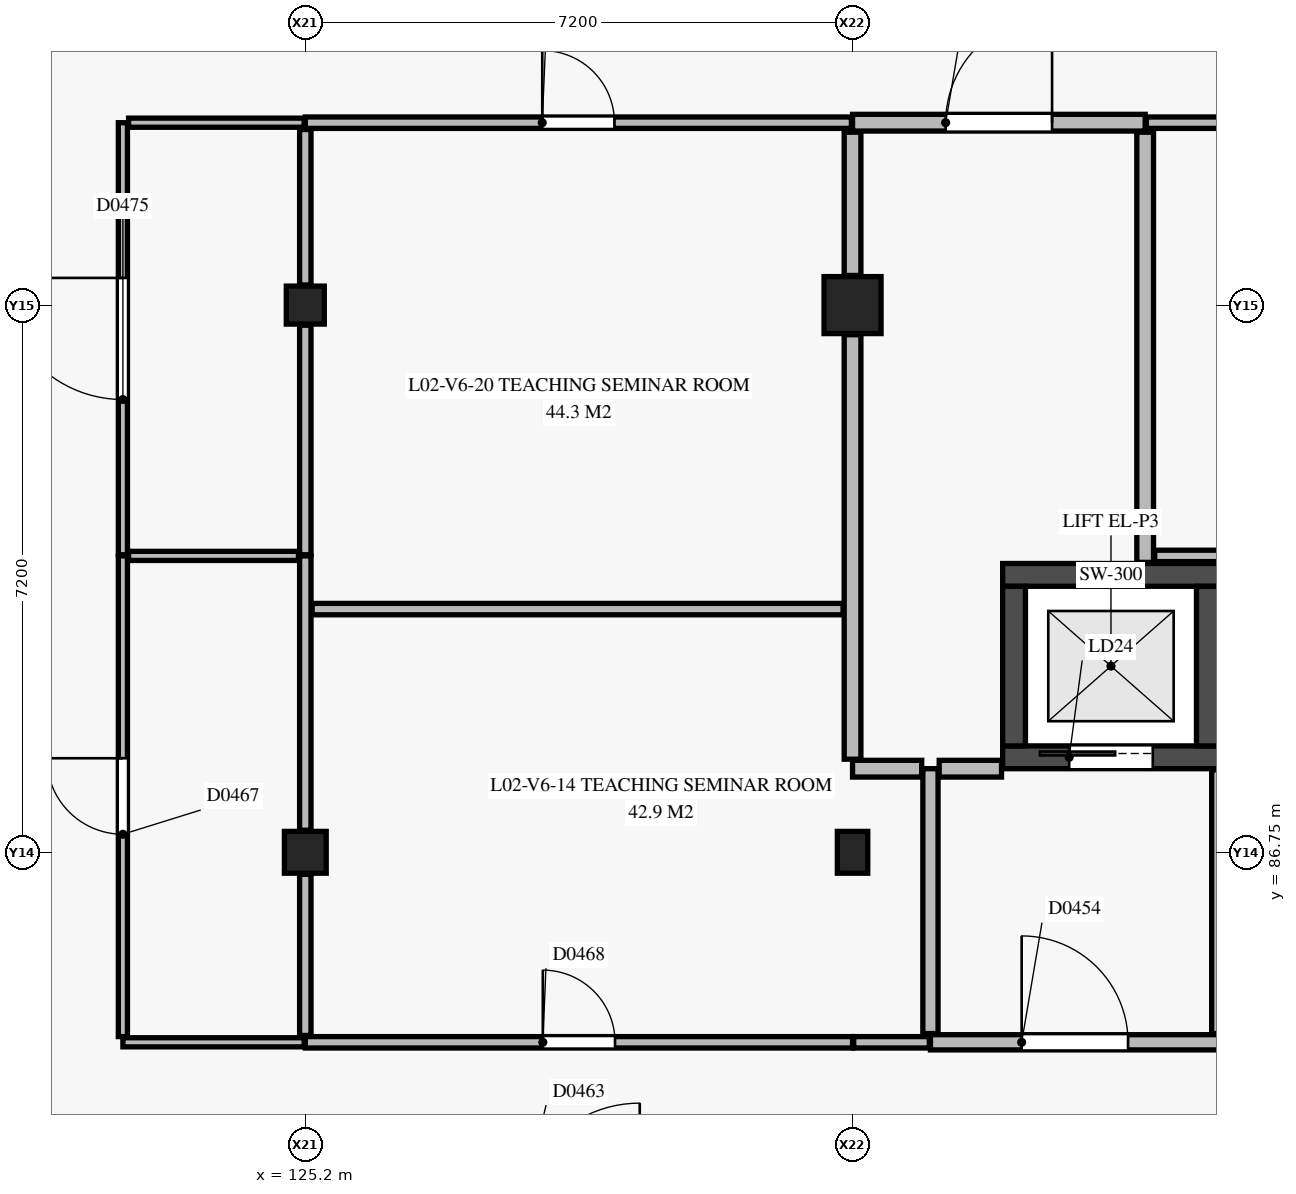
"""IFC4 building model, lengths in metres.
Left out: names, types, materials, properties, quantities, classifications, styles, units other than length and angle.
Written with IfcOpenShell. Run it as: python <this file> out.ifc"""

import sys

from ifc_helpers import new_model, si_unit, direction, frame, frame_2d, origin, origin_2d, place, context, subcontext, project, spatial, rectangle, extrude, element, fill, save


model = new_model("IFC4")
c1 = context("Model", 3, precision=1e-05, world=origin(), true_north=direction((0.0, 1.0)))
c2 = subcontext(c1, "Body", "Model", "MODEL_VIEW")
j1 = project(units=[si_unit("LENGTHUNIT", "METRE"), si_unit("PLANEANGLEUNIT", "RADIAN")], contexts=[c1])
p1 = place(None, origin())
s1 = spatial("IfcSite", under=j1, at=p1, CompositionType="ELEMENT")
p2 = place(p1, origin())
s2 = spatial("IfcBuilding", under=s1, at=p2, CompositionType="ELEMENT")
p3 = place(p2, frame((0.0, 0.0, 9.0)))
s3 = spatial("IfcBuildingStorey", under=s2, at=p3, CompositionType="ELEMENT", Elevation=9.0)
p4 = place(p3, frame((125.2, 86.75, 0.0), z_axis=(0.0, 0.0, 1.0), x_axis=(1.0, 0.0, 0.0)))
e1 = element("IfcColumn", 1, at=p4, inside=s3, PredefinedType="COLUMN", context=c2, shape_type="SweptSolid", body=[
    extrude(rectangle(XDim=0.55, YDim=0.55, at=origin_2d()), origin(), (0.0, 0.0, 1.0), 4.2),
])
p5 = place(p3, frame((125.2, 93.95, 0.0), z_axis=(0.0, 0.0, 1.0), x_axis=(1.0, 0.0, 0.0)))
e2 = element("IfcColumn", 2, at=p5, inside=s3, PredefinedType="COLUMN", context=c2, shape_type="SweptSolid", body=[
    extrude(rectangle(XDim=0.5, YDim=0.5, at=origin_2d()), origin(), (0.0, 0.0, 1.0), 4.2),
])
p6 = place(p3, frame((132.4, 86.75, 0.0), z_axis=(0.0, 0.0, 1.0), x_axis=(1.0, 0.0, 0.0)))
e3 = element("IfcColumn", 3, at=p6, inside=s3, PredefinedType="COLUMN", context=c2, shape_type="SweptSolid", body=[
    extrude(rectangle(XDim=0.4, YDim=0.55, at=origin_2d()), origin(), (0.0, 0.0, 1.0), 4.2),
])
p7 = place(p3, frame((132.4, 93.95, 0.0), z_axis=(0.0, 0.0, 1.0), x_axis=(1.0, 0.0, 0.0)))
e4 = element("IfcColumn", 4, at=p7, inside=s3, PredefinedType="COLUMN", context=c2, shape_type="SweptSolid", body=[
    extrude(rectangle(XDim=0.75, YDim=0.75, at=origin_2d()), origin(), (0.0, 0.0, 1.0), 4.2),
])
p8 = place(p3, frame((134.375, 88.0, 0.0), z_axis=(0.0, 0.0, 1.0), x_axis=(1.0, 0.0, 0.0)))
e5 = element("IfcWall", 5, at=p8, inside=s3, PredefinedType="SHEAR", context=c2, shape_type="SweptSolid", body=[
    extrude(rectangle(XDim=2.85, YDim=0.3, at=frame_2d((1.425, 0.0))), origin(), (0.0, 0.0, 1.0), 3.95),
])
p9 = place(p8, frame((0.875, 0.0, 0.0)))
e6 = element("IfcOpeningElement", 6, at=p9, cuts=e5, PredefinedType="OPENING", context=c2, shape_type="SweptSolid", body=[
    extrude(rectangle(XDim=1.1, YDim=2.15, at=frame_2d((0.55, 1.075))), frame((0.0, 0.16, 0.0), z_axis=(0.0, -1.0, 0.0), x_axis=(1.0, 0.0, 0.0)), (0.0, 0.0, 1.0), 0.32),
])
p10 = place(p3, frame((134.375, 90.4, 0.0), z_axis=(0.0, 0.0, 1.0), x_axis=(1.0, 0.0, 0.0)))
e7 = element("IfcWall", 7, at=p10, inside=s3, PredefinedType="SHEAR", context=c2, shape_type="SweptSolid", body=[
    extrude(rectangle(XDim=2.85, YDim=0.3, at=frame_2d((1.425, 0.0))), origin(), (0.0, 0.0, 1.0), 3.95),
])
for number, where, z_axis, x_axis in (
    (8, (134.525, 88.15, 0.0), (0.0, 0.0, 1.0), (0.0, 1.0, 0.0)),
    (9, (137.075, 88.15, 0.0), (0.0, 0.0, 1.0), (0.0, 1.0, 0.0)),
):
    element("IfcWall", number, at=place(p3, frame(where, z_axis=z_axis, x_axis=x_axis)), inside=s3, PredefinedType="SHEAR", context=c2, shape_type="SweptSolid", body=[
        extrude(rectangle(XDim=2.1, YDim=0.3, at=frame_2d((1.05, 0.0))), origin(), (0.0, 0.0, 1.0), 3.95),
    ])
p11 = place(p3, frame((133.425, 84.25, 0.0), z_axis=(0.0, 0.0, 1.0), x_axis=(1.0, 0.0, 0.0)))
e10 = element("IfcWall", 10, at=p11, inside=s3, PredefinedType="PARTITIONING", context=c2, shape_type="SweptSolid", body=[
    extrude(rectangle(XDim=3.8, YDim=0.2, at=frame_2d((1.9, 0.0))), origin(), (0.0, 0.0, 1.0), 3.515),
])
p12 = place(p11, frame((1.2, 0.0, 0.0)))
e11 = element("IfcOpeningElement", 11, at=p12, cuts=e10, PredefinedType="OPENING", context=c2, shape_type="SweptSolid", body=[
    extrude(rectangle(XDim=1.4, YDim=2.2, at=frame_2d((0.7, 1.1))), frame((0.0, 0.11, 0.0), z_axis=(0.0, -1.0, 0.0), x_axis=(1.0, 0.0, 0.0)), (0.0, 0.0, 1.0), 0.22),
])
p13 = place(p3, frame((137.225, 84.365, 0.0), z_axis=(0.0, 0.0, 1.0), x_axis=(0.0, 1.0, 0.0)))
e12 = element("IfcWall", 12, at=p13, inside=s3, PredefinedType="PARTITIONING", context=c2, shape_type="SweptSolid", body=[
    extrude(rectangle(XDim=3.47, YDim=0.2, at=frame_2d((1.735, 0.0))), origin(), (0.0, 0.0, 1.0), 3.355),
])
p14 = place(p3, frame((133.425, 84.365, 0.0), z_axis=(0.0, 0.0, 1.0), x_axis=(0.0, 1.0, 0.0)))
e13 = element("IfcWall", 13, at=p14, inside=s3, PredefinedType="PARTITIONING", context=c2, shape_type="SweptSolid", body=[
    extrude(rectangle(XDim=3.485, YDim=0.2, at=frame_2d((1.743, 0.0))), origin(), (0.0, 0.0, 1.0), 3.355),
])
p15 = place(p3, frame((132.4, 96.35, 0.0), z_axis=(0.0, 0.0, 1.0), x_axis=(1.0, 0.0, 0.0)))
e14 = element("IfcWall", 14, at=p15, inside=s3, PredefinedType="PARTITIONING", context=c2, shape_type="SweptSolid", body=[
    extrude(rectangle(XDim=3.85, YDim=0.22, at=frame_2d((1.925, 0.0))), origin(), (0.0, 0.0, 1.0), 3.415),
])
p16 = place(p15, frame((1.225, 0.0, 0.0)))
e15 = element("IfcOpeningElement", 15, at=p16, cuts=e14, PredefinedType="OPENING", context=c2, shape_type="SweptSolid", body=[
    extrude(rectangle(XDim=1.4, YDim=2.2, at=frame_2d((0.7, 1.1))), frame((0.0, 0.12, 0.0), z_axis=(0.0, -1.0, 0.0), x_axis=(1.0, 0.0, 0.0)), (0.0, 0.0, 1.0), 0.24),
])
p17 = place(p3, frame((125.2, 84.25, 0.0), z_axis=(0.0, 0.0, 1.0), x_axis=(1.0, 0.0, 0.0)))
e16 = element("IfcWall", 16, at=p17, inside=s3, PredefinedType="PARTITIONING", context=c2, shape_type="SweptSolid", body=[
    extrude(rectangle(XDim=7.2, YDim=0.15, at=frame_2d((3.6, 0.0))), origin(), (0.0, 0.0, 1.0), 3.285),
])
p18 = place(p17, frame((3.125, 0.0, 0.0)))
e17 = element("IfcOpeningElement", 17, at=p18, cuts=e16, PredefinedType="OPENING", context=c2, shape_type="SweptSolid", body=[
    extrude(rectangle(XDim=0.95, YDim=2.1, at=frame_2d((0.475, 1.05))), frame((0.0, 0.085, 0.0), z_axis=(0.0, -1.0, 0.0), x_axis=(1.0, 0.0, 0.0)), (0.0, 0.0, 1.0), 0.17),
])
p19 = place(p3, frame((132.415, 84.25, 0.0), z_axis=(0.0, 0.0, 1.0), x_axis=(1.0, 0.0, 0.0)))
e18 = element("IfcWall", 18, at=p19, inside=s3, PredefinedType="PARTITIONING", context=c2, shape_type="SweptSolid", body=[
    extrude(rectangle(XDim=0.995, YDim=0.15, at=frame_2d((0.498, 0.0))), origin(), (0.0, 0.0, 1.0), 3.285),
])
p20 = place(p3, frame((125.2, 96.35, 0.0), z_axis=(0.0, 0.0, 1.0), x_axis=(1.0, 0.0, 0.0)))
e19 = element("IfcWall", 19, at=p20, inside=s3, PredefinedType="PARTITIONING", context=c2, shape_type="SweptSolid", body=[
    extrude(rectangle(XDim=7.185, YDim=0.15, at=frame_2d((3.593, 0.0))), origin(), (0.0, 0.0, 1.0), 3.215),
])
p21 = place(p20, frame((3.117, 0.0, 0.0)))
e20 = element("IfcOpeningElement", 20, at=p21, cuts=e19, PredefinedType="OPENING", context=c2, shape_type="SweptSolid", body=[
    extrude(rectangle(XDim=0.95, YDim=2.1, at=frame_2d((0.475, 1.05))), frame((0.0, 0.085, 0.0), z_axis=(0.0, -1.0, 0.0), x_axis=(1.0, 0.0, 0.0)), (0.0, 0.0, 1.0), 0.17),
])
p22 = place(p3, frame((136.265, 96.35, 0.0), z_axis=(0.0, 0.0, 1.0), x_axis=(1.0, 0.0, 0.0)))
e21 = element("IfcWall", 21, at=p22, inside=s3, PredefinedType="PARTITIONING", context=c2, shape_type="SweptSolid", body=[
    extrude(rectangle(XDim=3.32, YDim=0.15, at=frame_2d((1.66, 0.0))), origin(), (0.0, 0.0, 1.0), 3.285),
])
p23 = place(p22, frame((1.035, 0.0, 0.0)))
e22 = element("IfcOpeningElement", 22, at=p23, cuts=e21, PredefinedType="OPENING", context=c2, shape_type="SweptSolid", body=[
    extrude(rectangle(XDim=1.25, YDim=2.15, at=frame_2d((0.625, 1.075))), frame((0.0, 0.085, 0.0), z_axis=(0.0, -1.0, 0.0), x_axis=(1.0, 0.0, 0.0)), (0.0, 0.0, 1.0), 0.17),
])
p24 = place(p3, frame((122.8, 84.25, 0.0), z_axis=(0.0, 0.0, 1.0), x_axis=(1.0, 0.0, 0.0)))
e23 = element("IfcWall", 23, at=p24, inside=s3, PredefinedType="PARTITIONING", context=c2, shape_type="SweptSolid", body=[
    extrude(rectangle(XDim=2.385, YDim=0.12, at=frame_2d((1.192, 0.0))), origin(), (0.0, 0.0, 1.0), 3.415),
])
p25 = place(p3, frame((122.8, 84.325, 0.0), z_axis=(0.0, 0.0, 1.0), x_axis=(0.0, 1.0, 0.0)))
e24 = element("IfcWall", 24, at=p25, inside=s3, PredefinedType="PARTITIONING", context=c2, shape_type="SweptSolid", body=[
    extrude(rectangle(XDim=6.325, YDim=0.12, at=frame_2d((3.163, 0.0))), origin(), (0.0, 0.0, 1.0), 3.235),
])
p26 = place(p25, frame((2.663, 0.0, 0.0)))
e25 = element("IfcOpeningElement", 25, at=p26, cuts=e24, PredefinedType="OPENING", context=c2, shape_type="SweptSolid", body=[
    extrude(rectangle(XDim=1.0, YDim=2.15, at=frame_2d((0.5, 1.075))), frame((0.0, 0.07, 0.0), z_axis=(0.0, -1.0, 0.0), x_axis=(1.0, 0.0, 0.0)), (0.0, 0.0, 1.0), 0.14),
])
p27 = place(p3, frame((122.8, 90.665, 0.0), z_axis=(0.0, 0.0, 1.0), x_axis=(0.0, 1.0, 0.0)))
e26 = element("IfcWall", 26, at=p27, inside=s3, PredefinedType="PARTITIONING", context=c2, shape_type="SweptSolid", body=[
    extrude(rectangle(XDim=5.685, YDim=0.12, at=frame_2d((2.843, 0.0))), origin(), (0.0, 0.0, 1.0), 3.355),
])
p28 = place(p27, frame((2.042, 0.0, 0.0)))
e27 = element("IfcOpeningElement", 27, at=p28, cuts=e26, PredefinedType="OPENING", context=c2, shape_type="SweptSolid", body=[
    extrude(rectangle(XDim=1.6, YDim=2.25, at=frame_2d((0.8, 1.125))), frame((0.0, 0.07, 0.0), z_axis=(0.0, -1.0, 0.0), x_axis=(1.0, 0.0, 0.0)), (0.0, 0.0, 1.0), 0.14),
])
p29 = place(p3, frame((122.875, 96.35, 0.0), z_axis=(0.0, 0.0, 1.0), x_axis=(1.0, 0.0, 0.0)))
e28 = element("IfcWall", 28, at=p29, inside=s3, PredefinedType="PARTITIONING", context=c2, shape_type="SweptSolid", body=[
    extrude(rectangle(XDim=2.31, YDim=0.12, at=frame_2d((1.155, 0.0))), origin(), (0.0, 0.0, 1.0), 3.215),
])
p30 = place(p3, frame((132.4, 87.85, 0.0), z_axis=(0.0, 0.0, 1.0), x_axis=(1.0, 0.0, 0.0)))
e29 = element("IfcWall", 29, at=p30, inside=s3, PredefinedType="PARTITIONING", context=c2, shape_type="SweptSolid", body=[
    extrude(rectangle(XDim=0.91, YDim=0.22, at=frame_2d((0.455, 0.0))), origin(), (0.0, 0.0, 1.0), 3.285),
])
p31 = place(p3, frame((136.25, 90.565, 0.0), z_axis=(0.0, 0.0, 1.0), x_axis=(0.0, 1.0, 0.0)))
e30 = element("IfcWall", 30, at=p31, inside=s3, PredefinedType="PARTITIONING", context=c2, shape_type="SweptSolid", body=[
    extrude(rectangle(XDim=5.66, YDim=0.22, at=frame_2d((2.83, 0.0))), origin(), (0.0, 0.0, 1.0), 3.135),
])
p32 = place(p3, frame((133.54, 87.85, 0.0), z_axis=(0.0, 0.0, 1.0), x_axis=(1.0, 0.0, 0.0)))
e31 = element("IfcWall", 31, at=p32, inside=s3, PredefinedType="PARTITIONING", context=c2, shape_type="SweptSolid", body=[
    extrude(rectangle(XDim=0.82, YDim=0.22, at=frame_2d((0.41, 0.0))), origin(), (0.0, 0.0, 1.0), 3.95),
])
p33 = place(p3, frame((132.4, 87.975, 0.0), z_axis=(0.0, 0.0, 1.0), x_axis=(0.0, 1.0, 0.0)))
e32 = element("IfcWall", 32, at=p33, inside=s3, PredefinedType="PARTITIONING", context=c2, shape_type="SweptSolid", body=[
    extrude(rectangle(XDim=5.585, YDim=0.22, at=frame_2d((2.792, 0.0))), origin(), (0.0, 0.0, 1.0), 3.285),
])
p34 = place(p3, frame((132.4, 94.34, 0.0), z_axis=(0.0, 0.0, 1.0), x_axis=(0.0, 1.0, 0.0)))
e33 = element("IfcWall", 33, at=p34, inside=s3, PredefinedType="PARTITIONING", context=c2, shape_type="SweptSolid", body=[
    extrude(rectangle(XDim=1.885, YDim=0.22, at=frame_2d((0.942, 0.0))), origin(), (0.0, 0.0, 1.0), 3.415),
])
p35 = place(p3, frame((125.2, 84.34, 0.0), z_axis=(0.0, 0.0, 1.0), x_axis=(0.0, 1.0, 0.0)))
e34 = element("IfcWall", 34, at=p35, inside=s3, PredefinedType="PARTITIONING", context=c2, shape_type="SweptSolid", body=[
    extrude(rectangle(XDim=2.12, YDim=0.15, at=frame_2d((1.06, 0.0))), origin(), (0.0, 0.0, 1.0), 3.415),
])
p36 = place(p3, frame((125.2, 87.04, 0.0), z_axis=(0.0, 0.0, 1.0), x_axis=(0.0, 1.0, 0.0)))
e35 = element("IfcWall", 35, at=p36, inside=s3, PredefinedType="PARTITIONING", context=c2, shape_type="SweptSolid", body=[
    extrude(rectangle(XDim=3.61, YDim=0.15, at=frame_2d((1.805, 0.0))), origin(), (0.0, 0.0, 1.0), 3.455),
])
p37 = place(p3, frame((125.29, 89.95, 0.0), z_axis=(0.0, 0.0, 1.0), x_axis=(1.0, 0.0, 0.0)))
e36 = element("IfcWall", 36, at=p37, inside=s3, PredefinedType="PARTITIONING", context=c2, shape_type="SweptSolid", body=[
    extrude(rectangle(XDim=6.985, YDim=0.15, at=frame_2d((3.492, 0.0))), origin(), (0.0, 0.0, 1.0), 3.95),
])
p38 = place(p3, frame((136.375, 90.65, 0.0), z_axis=(0.0, 0.0, 1.0), x_axis=(1.0, 0.0, 0.0)))
e37 = element("IfcWall", 37, at=p38, inside=s3, PredefinedType="PARTITIONING", context=c2, shape_type="SweptSolid", body=[
    extrude(rectangle(XDim=3.135, YDim=0.15, at=frame_2d((1.567, 0.0))), origin(), (0.0, 0.0, 1.0), 3.215),
])
p39 = place(p3, frame((125.2, 90.665, 0.0), z_axis=(0.0, 0.0, 1.0), x_axis=(0.0, 1.0, 0.0)))
e38 = element("IfcWall", 38, at=p39, inside=s3, PredefinedType="PARTITIONING", context=c2, shape_type="SweptSolid", body=[
    extrude(rectangle(XDim=3.02, YDim=0.15, at=frame_2d((1.51, 0.0))), origin(), (0.0, 0.0, 1.0), 3.455),
])
p40 = place(p3, frame((125.2, 94.215, 0.0), z_axis=(0.0, 0.0, 1.0), x_axis=(0.0, 1.0, 0.0)))
e39 = element("IfcWall", 39, at=p40, inside=s3, PredefinedType="PARTITIONING", context=c2, shape_type="SweptSolid", body=[
    extrude(rectangle(XDim=2.045, YDim=0.15, at=frame_2d((1.022, 0.0))), origin(), (0.0, 0.0, 1.0), 3.215),
])
p41 = place(p3, frame((122.875, 90.65, 0.0), z_axis=(0.0, 0.0, 1.0), x_axis=(1.0, 0.0, 0.0)))
e40 = element("IfcWall", 40, at=p41, inside=s3, PredefinedType="PARTITIONING", context=c2, shape_type="SweptSolid", body=[
    extrude(rectangle(XDim=2.235, YDim=0.12, at=frame_2d((1.118, 0.0))), origin(), (0.0, 0.0, 1.0), 3.95),
])
p42 = place(p9, origin())
e41 = element("IfcDoor", 41, at=p42, inside=s3, OperationType="SLIDING_TO_LEFT", PredefinedType="DOOR", context=c2, shape_type="SweptSolid", body=[
    extrude(rectangle(XDim=1.1, YDim=2.15, at=frame_2d((0.55, 1.075))), frame((0.0, 0.025, 0.0), z_axis=(0.0, -1.0, 0.0), x_axis=(1.0, 0.0, 0.0)), (0.0, 0.0, 1.0), 0.05),
])
fill(e6, e41)
p43 = place(p12, origin())
e42 = element("IfcDoor", 42, at=p43, inside=s3, OperationType="SINGLE_SWING_LEFT", PredefinedType="DOOR", context=c2, shape_type="SweptSolid", body=[
    extrude(rectangle(XDim=1.4, YDim=2.2, at=frame_2d((0.7, 1.1))), frame((0.0, 0.025, 0.0), z_axis=(0.0, -1.0, 0.0), x_axis=(1.0, 0.0, 0.0)), (0.0, 0.0, 1.0), 0.05),
])
fill(e11, e42)
p44 = place(p26, origin())
e43 = element("IfcDoor", 43, at=p44, inside=s3, OperationType="SINGLE_SWING_RIGHT", PredefinedType="DOOR", context=c2, shape_type="SweptSolid", body=[
    extrude(rectangle(XDim=1.0, YDim=2.15, at=frame_2d((0.5, 1.075))), frame((0.0, 0.025, 0.0), z_axis=(0.0, -1.0, 0.0), x_axis=(1.0, 0.0, 0.0)), (0.0, 0.0, 1.0), 0.05),
])
fill(e25, e43)
p45 = place(p18, origin())
e44 = element("IfcDoor", 44, at=p45, inside=s3, OperationType="SINGLE_SWING_LEFT", PredefinedType="DOOR", context=c2, shape_type="SweptSolid", body=[
    extrude(rectangle(XDim=0.95, YDim=2.1, at=frame_2d((0.475, 1.05))), frame((0.0, 0.025, 0.0), z_axis=(0.0, -1.0, 0.0), x_axis=(1.0, 0.0, 0.0)), (0.0, 0.0, 1.0), 0.05),
])
fill(e17, e44)
p46 = place(p16, origin())
e45 = element("IfcDoor", 45, at=p46, inside=s3, OperationType="SINGLE_SWING_RIGHT", PredefinedType="DOOR", context=c2, shape_type="SweptSolid", body=[
    extrude(rectangle(XDim=1.4, YDim=2.2, at=frame_2d((0.7, 1.1))), frame((0.0, 0.025, 0.0), z_axis=(0.0, -1.0, 0.0), x_axis=(1.0, 0.0, 0.0)), (0.0, 0.0, 1.0), 0.05),
])
fill(e15, e45)
p47 = place(p21, origin())
e46 = element("IfcDoor", 46, at=p47, inside=s3, OperationType="SINGLE_SWING_LEFT", PredefinedType="DOOR", context=c2, shape_type="SweptSolid", body=[
    extrude(rectangle(XDim=0.95, YDim=2.1, at=frame_2d((0.475, 1.05))), frame((0.0, 0.025, 0.0), z_axis=(0.0, -1.0, 0.0), x_axis=(1.0, 0.0, 0.0)), (0.0, 0.0, 1.0), 0.05),
])
fill(e20, e46)
p48 = place(p28, origin())
e47 = element("IfcDoor", 47, at=p48, inside=s3, OperationType="SINGLE_SWING_RIGHT", PredefinedType="DOOR", context=c2, shape_type="SweptSolid", body=[
    extrude(rectangle(XDim=1.6, YDim=2.25, at=frame_2d((0.8, 1.125))), frame((0.0, 0.025, 0.0), z_axis=(0.0, -1.0, 0.0), x_axis=(1.0, 0.0, 0.0)), (0.0, 0.0, 1.0), 0.05),
])
fill(e27, e47)
save(model, sys.argv[1])
